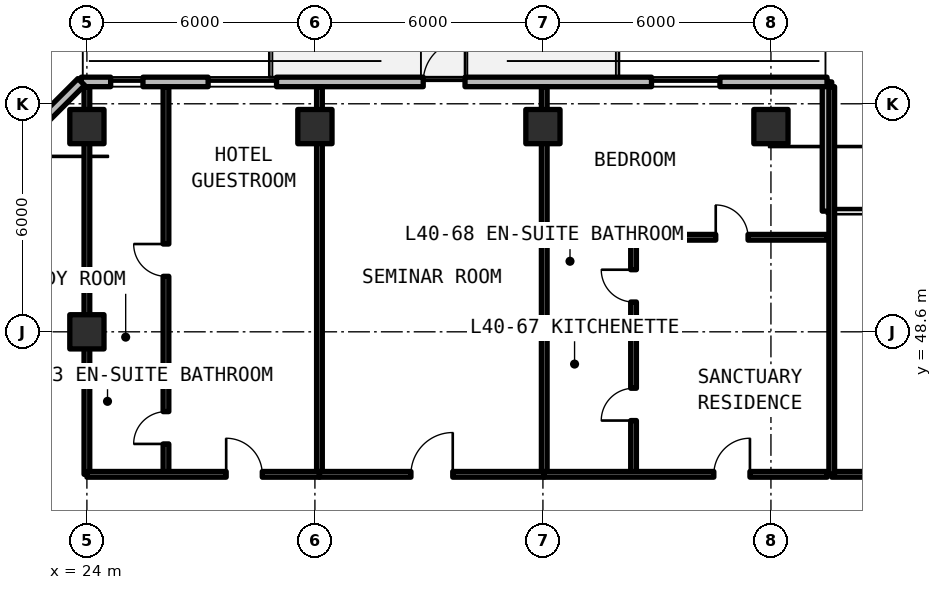
"""IFC4 building model, lengths in metres.
Left out: names, types, materials, properties, quantities, classifications, styles, units other than length and angle.
Written with IfcOpenShell. Run it as: python <this file> out.ifc"""

import sys

from ifc_helpers import new_model, si_unit, direction, frame, frame_2d, origin, origin_2d, place, context, subcontext, project, spatial, rectangle, extrude, element, fill, save


model = new_model("IFC4")
c1 = context("Model", 3, precision=1e-05, world=origin(), true_north=direction((0.0, 1.0)))
c2 = subcontext(c1, "Body", "Model", "MODEL_VIEW")
j1 = project(units=[si_unit("LENGTHUNIT", "METRE"), si_unit("PLANEANGLEUNIT", "RADIAN")], contexts=[c1])
p1 = place(None, origin())
s1 = spatial("IfcSite", under=j1, at=p1, CompositionType="ELEMENT")
p2 = place(p1, origin())
s2 = spatial("IfcBuilding", under=s1, at=p2, CompositionType="ELEMENT")
p3 = place(p2, frame((0.0, 0.0, 145.2)))
s3 = spatial("IfcBuildingStorey", under=s2, at=p3, CompositionType="ELEMENT", Elevation=145.2)
for number, where, z_axis, x_axis in (
    (1, (24.0, 48.6, 0.0), (0.0, 0.0, 1.0), (1.0, 0.0, 0.0)),
    (2, (24.0, 54.0, 0.0), (0.0, 0.0, 1.0), (1.0, 0.0, 0.0)),
    (3, (30.0, 54.0, 0.0), (0.0, 0.0, 1.0), (1.0, 0.0, 0.0)),
    (4, (36.0, 54.0, 0.0), (0.0, 0.0, 1.0), (1.0, 0.0, 0.0)),
    (5, (42.0, 54.0, 0.0), (0.0, 0.0, 1.0), (1.0, 0.0, 0.0)),
):
    element("IfcColumn", number, at=place(p3, frame(where, z_axis=z_axis, x_axis=x_axis)), inside=s3, PredefinedType="COLUMN", context=c2, shape_type="SweptSolid", body=[
        extrude(rectangle(XDim=0.9, YDim=0.9, at=origin_2d()), origin(), (0.0, 0.0, 1.0), 3.3),
    ])
p4 = place(p3, frame((43.475, 51.775, 0.0), z_axis=(0.0, 0.0, 1.0), x_axis=(0.0, 1.0, 0.0)))
e6 = element("IfcWall", 6, at=p4, inside=s3, PredefinedType="SOLIDWALL", context=c2, shape_type="SweptSolid", body=[
    extrude(rectangle(XDim=3.4, YDim=0.25, at=frame_2d((1.7, 0.0))), origin(), (0.0, 0.0, 1.0), 3.08),
])
p5 = place(p3, frame((43.475, 55.175, 0.0), z_axis=(0.0, 0.0, 1.0), x_axis=(-1.0, 0.0, 0.0)))
e7 = element("IfcWall", 7, at=p5, inside=s3, PredefinedType="SOLIDWALL", context=c2, shape_type="SweptSolid", body=[
    extrude(rectangle(XDim=19.623, YDim=0.25, at=frame_2d((9.812, 0.0))), origin(), (0.0, 0.0, 1.0), 3.08),
])
p6 = place(p5, frame((9.525, 0.0, 0.0)))
e8 = element("IfcOpeningElement", 8, at=p6, cuts=e7, PredefinedType="OPENING", context=c2, shape_type="SweptSolid", body=[
    extrude(rectangle(XDim=1.1, YDim=2.15, at=frame_2d((0.55, 1.075))), frame((0.0, 0.135, 0.0), z_axis=(0.0, -1.0, 0.0), x_axis=(1.0, 0.0, 0.0)), (0.0, 0.0, 1.0), 0.27),
])
p7 = place(p5, frame((18.0, 0.0, 0.78)))
e9 = element("IfcOpeningElement", 9, at=p7, cuts=e7, PredefinedType="OPENING", context=c2, shape_type="SweptSolid", body=[
    extrude(rectangle(XDim=0.85, YDim=1.65, at=frame_2d((0.425, 0.825))), frame((0.0, 0.135, 0.0), z_axis=(0.0, -1.0, 0.0), x_axis=(1.0, 0.0, 0.0)), (0.0, 0.0, 1.0), 0.27),
])
p8 = place(p5, frame((14.485, 0.0, 0.78)))
e10 = element("IfcOpeningElement", 10, at=p8, cuts=e7, PredefinedType="OPENING", context=c2, shape_type="SweptSolid", body=[
    extrude(rectangle(XDim=1.8, YDim=1.66, at=frame_2d((0.9, 0.83))), frame((0.0, 0.135, 0.0), z_axis=(0.0, -1.0, 0.0), x_axis=(1.0, 0.0, 0.0)), (0.0, 0.0, 1.0), 0.27),
])
p9 = place(p5, frame((2.818, 0.0, 0.78)))
e11 = element("IfcOpeningElement", 11, at=p9, cuts=e7, PredefinedType="OPENING", context=c2, shape_type="SweptSolid", body=[
    extrude(rectangle(XDim=1.8, YDim=1.66, at=frame_2d((0.9, 0.83))), frame((0.0, 0.135, 0.0), z_axis=(0.0, -1.0, 0.0), x_axis=(1.0, 0.0, 0.0)), (0.0, 0.0, 1.0), 0.27),
])
p10 = place(p3, frame((23.852, 55.175, 0.0), z_axis=(0.0, 0.0, 1.0), x_axis=(-0.70708586489, -0.707127696864, 0.0)))
e12 = element("IfcWall", 12, at=p10, inside=s3, PredefinedType="SOLIDWALL", context=c2, shape_type="SweptSolid", body=[
    extrude(rectangle(XDim=5.836, YDim=0.25, at=frame_2d((2.918, 0.0))), origin(), (0.0, 0.0, 1.0), 3.08),
])
p11 = place(p10, frame((1.538, 0.0, 0.78)))
e13 = element("IfcOpeningElement", 13, at=p11, cuts=e12, PredefinedType="OPENING", context=c2, shape_type="SweptSolid", body=[
    extrude(rectangle(XDim=3.4, YDim=1.66, at=frame_2d((1.7, 0.83))), frame((0.0, 0.135, 0.0), z_axis=(0.0, -1.0, 0.0), x_axis=(1.0, 0.0, 0.0)), (0.0, 0.0, 1.0), 0.27),
])
p12 = place(p3, frame((43.6, 44.85, 0.0), z_axis=(0.0, 0.0, 1.0), x_axis=(1.0, 0.0, 0.0)))
e14 = element("IfcWall", 14, at=p12, inside=s3, PredefinedType="SOLIDWALL", context=c2, shape_type="SweptSolid", body=[
    extrude(rectangle(XDim=8.4, YDim=0.15, at=frame_2d((4.2, 0.0))), origin(), (0.0, 0.0, 1.0), 2.35),
])
p13 = place(p12, frame((3.65, 0.0, 0.0)))
e15 = element("IfcOpeningElement", 15, at=p13, cuts=e14, PredefinedType="OPENING", context=c2, shape_type="SweptSolid", body=[
    extrude(rectangle(XDim=1.1, YDim=2.15, at=frame_2d((0.55, 1.075))), frame((0.0, 0.085, 0.0), z_axis=(0.0, -1.0, 0.0), x_axis=(1.0, 0.0, 0.0)), (0.0, 0.0, 1.0), 0.17),
])
for number, where, z_axis, x_axis in (
    (16, (43.6, 44.85, 0.0), (0.0, 0.0, 1.0), (0.0, 1.0, 0.0)),
    (17, (24.0, 44.85, 0.0), (0.0, 0.0, 1.0), (0.0, 1.0, 0.0)),
    (18, (30.119, 44.85, 0.0), (0.0, 0.0, 1.0), (0.0, 1.0, 0.0)),
):
    element("IfcWall", number, at=place(p3, frame(where, z_axis=z_axis, x_axis=x_axis)), inside=s3, PredefinedType="SOLIDWALL", context=c2, shape_type="SweptSolid", body=[
        extrude(rectangle(XDim=10.2, YDim=0.15, at=frame_2d((5.1, 0.0))), origin(), (0.0, 0.0, 1.0), 2.35),
    ])
p14 = place(p3, frame((24.0, 47.3, 0.0), z_axis=(0.0, 0.0, 1.0), x_axis=(1.0, 0.0, 0.0)))
e19 = element("IfcWall", 19, at=p14, inside=s3, PredefinedType="PARTITIONING", context=c2, shape_type="SweptSolid", body=[
    extrude(rectangle(XDim=2.081, YDim=0.15, at=frame_2d((1.04, 0.0))), origin(), (0.0, 0.0, 1.0), 2.35),
])
p15 = place(p3, frame((26.081, 44.85, 0.0), z_axis=(0.0, 0.0, 1.0), x_axis=(0.0, 1.0, 0.0)))
e20 = element("IfcWall", 20, at=p15, inside=s3, PredefinedType="PARTITIONING", context=c2, shape_type="SweptSolid", body=[
    extrude(rectangle(XDim=10.2, YDim=0.15, at=frame_2d((5.1, 0.0))), origin(), (0.0, 0.0, 1.0), 2.35),
])
p16 = place(p15, frame((0.8, 0.0, 0.0)))
e21 = element("IfcOpeningElement", 21, at=p16, cuts=e20, PredefinedType="OPENING", context=c2, shape_type="SweptSolid", body=[
    extrude(rectangle(XDim=0.85, YDim=2.1, at=frame_2d((0.425, 1.05))), frame((0.0, 0.085, 0.0), z_axis=(0.0, -1.0, 0.0), x_axis=(1.0, 0.0, 0.0)), (0.0, 0.0, 1.0), 0.17),
])
p17 = place(p15, frame((5.21, 0.0, 0.0)))
e22 = element("IfcOpeningElement", 22, at=p17, cuts=e20, PredefinedType="OPENING", context=c2, shape_type="SweptSolid", body=[
    extrude(rectangle(XDim=0.85, YDim=2.1, at=frame_2d((0.425, 1.05))), frame((0.0, 0.085, 0.0), z_axis=(0.0, -1.0, 0.0), x_axis=(1.0, 0.0, 0.0)), (0.0, 0.0, 1.0), 0.17),
])
p18 = place(p3, frame((24.0, 44.85, 0.0), z_axis=(0.0, 0.0, 1.0), x_axis=(1.0, 0.0, 0.0)))
e23 = element("IfcWall", 23, at=p18, inside=s3, PredefinedType="SOLIDWALL", context=c2, shape_type="SweptSolid", body=[
    extrude(rectangle(XDim=6.119, YDim=0.15, at=frame_2d((3.06, 0.0))), origin(), (0.0, 0.0, 1.0), 2.35),
])
p19 = place(p18, frame((3.665, 0.0, 0.0)))
e24 = element("IfcOpeningElement", 24, at=p19, cuts=e23, PredefinedType="OPENING", context=c2, shape_type="SweptSolid", body=[
    extrude(rectangle(XDim=0.95, YDim=2.15, at=frame_2d((0.475, 1.075))), frame((0.0, 0.085, 0.0), z_axis=(0.0, -1.0, 0.0), x_axis=(1.0, 0.0, 0.0)), (0.0, 0.0, 1.0), 0.17),
])
p20 = place(p3, frame((36.035, 44.85, 0.0), z_axis=(0.0, 0.0, 1.0), x_axis=(0.0, 1.0, 0.0)))
e25 = element("IfcWall", 25, at=p20, inside=s3, PredefinedType="SOLIDWALL", context=c2, shape_type="SweptSolid", body=[
    extrude(rectangle(XDim=10.2, YDim=0.15, at=frame_2d((5.1, 0.0))), origin(), (0.0, 0.0, 1.0), 2.35),
])
p21 = place(p3, frame((30.119, 44.85, 0.0), z_axis=(0.0, 0.0, 1.0), x_axis=(1.0, 0.0, 0.0)))
e26 = element("IfcWall", 26, at=p21, inside=s3, PredefinedType="SOLIDWALL", context=c2, shape_type="SweptSolid", body=[
    extrude(rectangle(XDim=5.916, YDim=0.15, at=frame_2d((2.958, 0.0))), origin(), (0.0, 0.0, 1.0), 2.35),
])
p22 = place(p21, frame((2.408, 0.0, 0.0)))
e27 = element("IfcOpeningElement", 27, at=p22, cuts=e26, PredefinedType="OPENING", context=c2, shape_type="SweptSolid", body=[
    extrude(rectangle(XDim=1.1, YDim=2.15, at=frame_2d((0.55, 1.075))), frame((0.0, 0.085, 0.0), z_axis=(0.0, -1.0, 0.0), x_axis=(1.0, 0.0, 0.0)), (0.0, 0.0, 1.0), 0.17),
])
p23 = place(p3, frame((36.035, 48.53, 0.0), z_axis=(0.0, 0.0, 1.0), x_axis=(1.0, 0.0, 0.0)))
e28 = element("IfcWall", 28, at=p23, inside=s3, PredefinedType="PARTITIONING", context=c2, shape_type="SweptSolid", body=[
    extrude(rectangle(XDim=2.35, YDim=0.15, at=frame_2d((1.175, 0.0))), origin(), (0.0, 0.0, 1.0), 2.35),
])
p24 = place(p3, frame((38.385, 44.85, 0.0), z_axis=(0.0, 0.0, 1.0), x_axis=(0.0, 1.0, 0.0)))
e29 = element("IfcWall", 29, at=p24, inside=s3, PredefinedType="PARTITIONING", context=c2, shape_type="SweptSolid", body=[
    extrude(rectangle(XDim=6.238, YDim=0.15, at=frame_2d((3.119, 0.0))), origin(), (0.0, 0.0, 1.0), 2.35),
])
p25 = place(p24, frame((1.415, 0.0, 0.0)))
e30 = element("IfcOpeningElement", 30, at=p25, cuts=e29, PredefinedType="OPENING", context=c2, shape_type="SweptSolid", body=[
    extrude(rectangle(XDim=0.85, YDim=2.1, at=frame_2d((0.425, 1.05))), frame((0.0, 0.085, 0.0), z_axis=(0.0, -1.0, 0.0), x_axis=(1.0, 0.0, 0.0)), (0.0, 0.0, 1.0), 0.17),
])
p26 = place(p24, frame((4.534, 0.0, 0.0)))
e31 = element("IfcOpeningElement", 31, at=p26, cuts=e29, PredefinedType="OPENING", context=c2, shape_type="SweptSolid", body=[
    extrude(rectangle(XDim=0.85, YDim=2.1, at=frame_2d((0.425, 1.05))), frame((0.0, 0.085, 0.0), z_axis=(0.0, -1.0, 0.0), x_axis=(1.0, 0.0, 0.0)), (0.0, 0.0, 1.0), 0.17),
])
p27 = place(p3, frame((36.035, 51.088, 0.0), z_axis=(0.0, 0.0, 1.0), x_axis=(1.0, 0.0, 0.0)))
e32 = element("IfcWall", 32, at=p27, inside=s3, PredefinedType="PARTITIONING", context=c2, shape_type="SweptSolid", body=[
    extrude(rectangle(XDim=7.445, YDim=0.15, at=frame_2d((3.723, 0.0))), origin(), (0.0, 0.0, 1.0), 2.35),
])
p28 = place(p27, frame((4.513, 0.0, 0.0)))
e33 = element("IfcOpeningElement", 33, at=p28, cuts=e32, PredefinedType="OPENING", context=c2, shape_type="SweptSolid", body=[
    extrude(rectangle(XDim=0.85, YDim=2.1, at=frame_2d((0.425, 1.05))), frame((0.0, 0.085, 0.0), z_axis=(0.0, -1.0, 0.0), x_axis=(1.0, 0.0, 0.0)), (0.0, 0.0, 1.0), 0.17),
])
p29 = place(p3, frame((36.035, 44.85, 0.0), z_axis=(0.0, 0.0, 1.0), x_axis=(1.0, 0.0, 0.0)))
e34 = element("IfcWall", 34, at=p29, inside=s3, PredefinedType="SOLIDWALL", context=c2, shape_type="SweptSolid", body=[
    extrude(rectangle(XDim=7.445, YDim=0.15, at=frame_2d((3.723, 0.0))), origin(), (0.0, 0.0, 1.0), 2.35),
])
p30 = place(p29, frame((4.463, 0.0, 0.0)))
e35 = element("IfcOpeningElement", 35, at=p30, cuts=e34, PredefinedType="OPENING", context=c2, shape_type="SweptSolid", body=[
    extrude(rectangle(XDim=0.95, YDim=2.15, at=frame_2d((0.475, 1.075))), frame((0.0, 0.085, 0.0), z_axis=(0.0, -1.0, 0.0), x_axis=(1.0, 0.0, 0.0)), (0.0, 0.0, 1.0), 0.17),
])
p31 = place(p6, frame((1.1, 0.0, 0.0), z_axis=(0.0, 0.0, 1.0), x_axis=(-1.0, 0.0, 0.0)))
e36 = element("IfcDoor", 36, at=p31, inside=s3, OperationType="SINGLE_SWING_RIGHT", PredefinedType="DOOR", context=c2, shape_type="SweptSolid", body=[
    extrude(rectangle(XDim=1.1, YDim=2.15, at=frame_2d((0.55, 1.075))), frame((0.0, 0.025, 0.0), z_axis=(0.0, -1.0, 0.0), x_axis=(1.0, 0.0, 0.0)), (0.0, 0.0, 1.0), 0.05),
])
fill(e8, e36)
p32 = place(p7, origin())
e37 = element("IfcWindow", 37, at=p32, inside=s3, PartitioningType="SINGLE_PANEL", PredefinedType="WINDOW", context=c2, shape_type="SweptSolid", body=[
    extrude(rectangle(XDim=0.85, YDim=1.65, at=frame_2d((0.425, 0.825))), frame((0.0, 0.03, 0.0), z_axis=(0.0, -1.0, 0.0), x_axis=(1.0, 0.0, 0.0)), (0.0, 0.0, 1.0), 0.06),
])
fill(e9, e37)
p33 = place(p8, origin())
e38 = element("IfcWindow", 38, at=p33, inside=s3, PartitioningType="SINGLE_PANEL", PredefinedType="WINDOW", context=c2, shape_type="SweptSolid", body=[
    extrude(rectangle(XDim=1.8, YDim=1.66, at=frame_2d((0.9, 0.83))), frame((0.0, 0.03, 0.0), z_axis=(0.0, -1.0, 0.0), x_axis=(1.0, 0.0, 0.0)), (0.0, 0.0, 1.0), 0.06),
])
fill(e10, e38)
p34 = place(p9, origin())
e39 = element("IfcWindow", 39, at=p34, inside=s3, PartitioningType="SINGLE_PANEL", PredefinedType="WINDOW", context=c2, shape_type="SweptSolid", body=[
    extrude(rectangle(XDim=1.8, YDim=1.66, at=frame_2d((0.9, 0.83))), frame((0.0, 0.03, 0.0), z_axis=(0.0, -1.0, 0.0), x_axis=(1.0, 0.0, 0.0)), (0.0, 0.0, 1.0), 0.06),
])
fill(e11, e39)
p35 = place(p16, origin())
e40 = element("IfcDoor", 40, at=p35, inside=s3, OperationType="SINGLE_SWING_LEFT", PredefinedType="DOOR", context=c2, shape_type="SweptSolid", body=[
    extrude(rectangle(XDim=0.85, YDim=2.1, at=frame_2d((0.425, 1.05))), frame((0.0, 0.025, 0.0), z_axis=(0.0, -1.0, 0.0), x_axis=(1.0, 0.0, 0.0)), (0.0, 0.0, 1.0), 0.05),
])
fill(e21, e40)
p36 = place(p17, origin())
e41 = element("IfcDoor", 41, at=p36, inside=s3, OperationType="SINGLE_SWING_RIGHT", PredefinedType="DOOR", context=c2, shape_type="SweptSolid", body=[
    extrude(rectangle(XDim=0.85, YDim=2.1, at=frame_2d((0.425, 1.05))), frame((0.0, 0.025, 0.0), z_axis=(0.0, -1.0, 0.0), x_axis=(1.0, 0.0, 0.0)), (0.0, 0.0, 1.0), 0.05),
])
fill(e22, e41)
p37 = place(p19, origin())
e42 = element("IfcDoor", 42, at=p37, inside=s3, OperationType="SINGLE_SWING_LEFT", PredefinedType="DOOR", context=c2, shape_type="SweptSolid", body=[
    extrude(rectangle(XDim=0.95, YDim=2.15, at=frame_2d((0.475, 1.075))), frame((0.0, 0.025, 0.0), z_axis=(0.0, -1.0, 0.0), x_axis=(1.0, 0.0, 0.0)), (0.0, 0.0, 1.0), 0.05),
])
fill(e24, e42)
p38 = place(p22, origin())
e43 = element("IfcDoor", 43, at=p38, inside=s3, OperationType="SINGLE_SWING_RIGHT", PredefinedType="DOOR", context=c2, shape_type="SweptSolid", body=[
    extrude(rectangle(XDim=1.1, YDim=2.15, at=frame_2d((0.55, 1.075))), frame((0.0, 0.025, 0.0), z_axis=(0.0, -1.0, 0.0), x_axis=(1.0, 0.0, 0.0)), (0.0, 0.0, 1.0), 0.05),
])
fill(e27, e43)
p39 = place(p25, origin())
e44 = element("IfcDoor", 44, at=p39, inside=s3, OperationType="SINGLE_SWING_LEFT", PredefinedType="DOOR", context=c2, shape_type="SweptSolid", body=[
    extrude(rectangle(XDim=0.85, YDim=2.1, at=frame_2d((0.425, 1.05))), frame((0.0, 0.025, 0.0), z_axis=(0.0, -1.0, 0.0), x_axis=(1.0, 0.0, 0.0)), (0.0, 0.0, 1.0), 0.05),
])
fill(e30, e44)
p40 = place(p26, origin())
e45 = element("IfcDoor", 45, at=p40, inside=s3, OperationType="SINGLE_SWING_RIGHT", PredefinedType="DOOR", context=c2, shape_type="SweptSolid", body=[
    extrude(rectangle(XDim=0.85, YDim=2.1, at=frame_2d((0.425, 1.05))), frame((0.0, 0.025, 0.0), z_axis=(0.0, -1.0, 0.0), x_axis=(1.0, 0.0, 0.0)), (0.0, 0.0, 1.0), 0.05),
])
fill(e31, e45)
p41 = place(p28, origin())
e46 = element("IfcDoor", 46, at=p41, inside=s3, OperationType="SINGLE_SWING_LEFT", PredefinedType="DOOR", context=c2, shape_type="SweptSolid", body=[
    extrude(rectangle(XDim=0.85, YDim=2.1, at=frame_2d((0.425, 1.05))), frame((0.0, 0.025, 0.0), z_axis=(0.0, -1.0, 0.0), x_axis=(1.0, 0.0, 0.0)), (0.0, 0.0, 1.0), 0.05),
])
fill(e33, e46)
p42 = place(p30, origin())
e47 = element("IfcDoor", 47, at=p42, inside=s3, OperationType="SINGLE_SWING_RIGHT", PredefinedType="DOOR", context=c2, shape_type="SweptSolid", body=[
    extrude(rectangle(XDim=0.95, YDim=2.15, at=frame_2d((0.475, 1.075))), frame((0.0, 0.025, 0.0), z_axis=(0.0, -1.0, 0.0), x_axis=(1.0, 0.0, 0.0)), (0.0, 0.0, 1.0), 0.05),
])
fill(e35, e47)
save(model, sys.argv[1])
